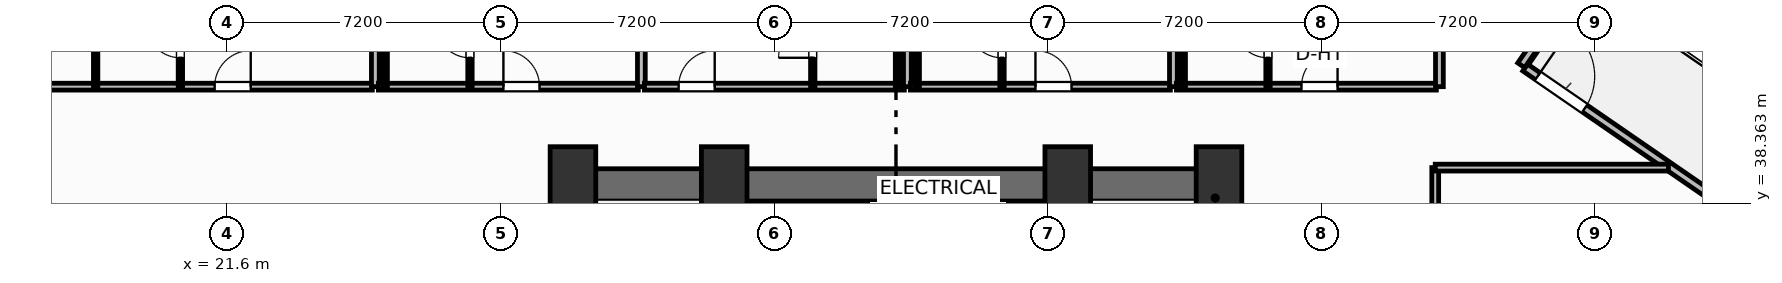
"""IFC4 building model, lengths in metres.
Left out: names, types, materials, properties, quantities, classifications, styles, units other than length and angle.
Written with IfcOpenShell. Run it as: python <this file> out.ifc"""

import sys

from ifc_helpers import new_model, si_unit, direction, frame, frame_2d, origin, origin_2d, place, context, subcontext, project, spatial, rectangle, extrude, element, fill, save


model = new_model("IFC4")
c1 = context("Model", 3, precision=1e-05, world=origin(), true_north=direction((0.0, 1.0)))
c2 = subcontext(c1, "Body", "Model", "MODEL_VIEW")
j1 = project(units=[si_unit("LENGTHUNIT", "METRE"), si_unit("PLANEANGLEUNIT", "RADIAN")], contexts=[c1])
p1 = place(None, origin())
s1 = spatial("IfcSite", under=j1, at=p1, CompositionType="ELEMENT")
p2 = place(p1, origin())
s2 = spatial("IfcBuilding", under=s1, at=p2, CompositionType="ELEMENT")
p3 = place(p2, frame((0.0, 0.0, 30.7)))
s3 = spatial("IfcBuildingStorey", under=s2, at=p3, CompositionType="ELEMENT", Elevation=30.7)
for number, where, z_axis, x_axis in (
    (1, (30.7, 39.05, 0.0), (0.0, 0.0, 1.0), (1.0, 0.0, 0.0)),
    (2, (34.68, 39.05, 0.0), (0.0, 0.0, 1.0), (1.0, 0.0, 0.0)),
    (3, (43.72, 39.05, 0.0), (0.0, 0.0, 1.0), (1.0, 0.0, 0.0)),
    (4, (47.7, 39.05, 0.0), (0.0, 0.0, 1.0), (1.0, 0.0, 0.0)),
):
    element("IfcColumn", number, at=place(p3, frame(where, z_axis=z_axis, x_axis=x_axis)), inside=s3, PredefinedType="COLUMN", context=c2, shape_type="SweptSolid", body=[
        extrude(rectangle(XDim=1.2, YDim=1.6, at=origin_2d()), origin(), (0.0, 0.0, 1.0), 3.7),
    ])
p4 = place(p3, frame((30.28, 38.845, 0.0), z_axis=(0.0, 0.0, 1.0), x_axis=(1.0, 0.0, 0.0)))
e5 = element("IfcWall", 5, at=p4, inside=s3, PredefinedType="SHEAR", context=c2, shape_type="SweptSolid", body=[
    extrude(rectangle(XDim=17.84, YDim=0.85, at=frame_2d((8.92, 0.0))), origin(), (0.0, 0.0, 1.0), 3.45),
])
for number, where, z_axis, x_axis in (
    (6, (30.705, 29.2, 0.0), (0.0, 0.0, 1.0), (0.0, 1.0, 0.0)),
    (7, (47.695, 29.2, 0.0), (0.0, 0.0, 1.0), (0.0, 1.0, 0.0)),
):
    element("IfcWall", number, at=place(p3, frame(where, z_axis=z_axis, x_axis=x_axis)), inside=s3, PredefinedType="SHEAR", context=c2, shape_type="SweptSolid", body=[
        extrude(rectangle(XDim=9.22, YDim=0.85, at=frame_2d((4.61, 0.0))), origin(), (0.0, 0.0, 1.0), 3.45),
    ])
p5 = place(p3, frame((34.64, 29.2, 0.0), z_axis=(0.0, 0.0, 1.0), x_axis=(0.0, 1.0, 0.0)))
e8 = element("IfcWall", 8, at=p5, inside=s3, PredefinedType="SHEAR", context=c2, shape_type="SweptSolid", body=[
    extrude(rectangle(XDim=9.22, YDim=0.25, at=frame_2d((4.61, 0.0))), origin(), (0.0, 0.0, 1.0), 3.45),
])
p6 = place(p5, frame((0.65, 0.0, 0.0)))
e9 = element("IfcOpeningElement", 9, at=p6, cuts=e8, PredefinedType="OPENING", context=c2, shape_type="SweptSolid", body=[
    extrude(rectangle(XDim=1.05, YDim=2.15, at=frame_2d((0.525, 1.075))), frame((0.0, 0.135, 0.0), z_axis=(0.0, -1.0, 0.0), x_axis=(1.0, 0.0, 0.0)), (0.0, 0.0, 1.0), 0.27),
])
p7 = place(p3, frame((43.76, 29.2, 0.0), z_axis=(0.0, 0.0, 1.0), x_axis=(0.0, 1.0, 0.0)))
e10 = element("IfcWall", 10, at=p7, inside=s3, PredefinedType="SHEAR", context=c2, shape_type="SweptSolid", body=[
    extrude(rectangle(XDim=9.22, YDim=0.25, at=frame_2d((4.61, 0.0))), origin(), (0.0, 0.0, 1.0), 3.45),
])
p8 = place(p7, frame((0.65, 0.0, 0.0)))
e11 = element("IfcOpeningElement", 11, at=p8, cuts=e10, PredefinedType="OPENING", context=c2, shape_type="SweptSolid", body=[
    extrude(rectangle(XDim=1.05, YDim=2.15, at=frame_2d((0.525, 1.075))), frame((0.0, 0.135, 0.0), z_axis=(0.0, -1.0, 0.0), x_axis=(1.0, 0.0, 0.0)), (0.0, 0.0, 1.0), 0.27),
])
p9 = place(p3, frame((55.757, 41.933, 0.0), z_axis=(0.0, 0.0, 1.0), x_axis=(0.823534636215, -0.567265989598, 0.0)))
e12 = element("IfcWall", 12, at=p9, inside=s3, PredefinedType="SOLIDWALL", context=c2, shape_type="SweptSolid", body=[
    extrude(rectangle(XDim=6.0, YDim=0.22, at=frame_2d((3.0, 0.0))), origin(), (0.0, 0.0, 1.0), 2.73),
])
p10 = place(p9, frame((0.4, 0.0, 0.0)))
e13 = element("IfcOpeningElement", 13, at=p10, cuts=e12, PredefinedType="OPENING", context=c2, shape_type="SweptSolid", body=[
    extrude(rectangle(XDim=1.5, YDim=2.25, at=frame_2d((0.75, 1.125))), frame((0.0, 0.12, 0.0), z_axis=(0.0, -1.0, 0.0), x_axis=(1.0, 0.0, 0.0)), (0.0, 0.0, 1.0), 0.24),
])
p11 = place(p3, frame((55.653, 41.993, 0.0), z_axis=(0.0, 0.0, 1.0), x_axis=(0.567273696173, 0.823529327729, 0.0)))
e14 = element("IfcWall", 14, at=p11, inside=s3, PredefinedType="SOLIDWALL", context=c2, shape_type="SweptSolid", body=[
    extrude(rectangle(XDim=2.1, YDim=0.22, at=frame_2d((1.05, 0.0))), origin(), (0.0, 0.0, 1.0), 2.73),
])
p12 = place(p3, frame((2.921, 41.43, 0.0), z_axis=(0.0, 0.0, 1.0), x_axis=(1.0, 0.0, 0.0)))
e15 = element("IfcWall", 15, at=p12, inside=s3, PredefinedType="PARTITIONING", context=c2, shape_type="SweptSolid", body=[
    extrude(rectangle(XDim=22.499, YDim=0.18, at=frame_2d((11.25, 0.0))), origin(), (0.0, 0.0, 1.0), 3.45),
])
p13 = place(p12, frame((18.35, 0.0, 0.0)))
e16 = element("IfcOpeningElement", 16, at=p13, cuts=e15, PredefinedType="OPENING", context=c2, shape_type="SweptSolid", body=[
    extrude(rectangle(XDim=0.95, YDim=2.15, at=frame_2d((0.475, 1.075))), frame((0.0, 0.1, 0.0), z_axis=(0.0, -1.0, 0.0), x_axis=(1.0, 0.0, 0.0)), (0.0, 0.0, 1.0), 0.2),
])
p14 = place(p3, frame((20.37, 41.43, 0.0), z_axis=(0.0, 0.0, 1.0), x_axis=(0.0, 1.0, 0.0)))
e17 = element("IfcWall", 17, at=p14, inside=s3, PredefinedType="PARTITIONING", context=c2, shape_type="SweptSolid", body=[
    extrude(rectangle(XDim=2.52, YDim=0.115, at=frame_2d((1.26, 0.0))), origin(), (0.0, 0.0, 1.0), 3.45),
])
p15 = place(p14, frame((0.76, 0.0, 0.0)))
e18 = element("IfcOpeningElement", 18, at=p15, cuts=e17, PredefinedType="OPENING", context=c2, shape_type="SweptSolid", body=[
    extrude(rectangle(XDim=0.9, YDim=2.05, at=frame_2d((0.45, 1.025))), frame((0.0, 0.067, 0.0), z_axis=(0.0, -1.0, 0.0), x_axis=(1.0, 0.0, 0.0)), (0.0, 0.0, 1.0), 0.135),
])
p16 = place(p3, frame((18.14, 41.43, 0.0), z_axis=(0.0, 0.0, 1.0), x_axis=(0.0, 1.0, 0.0)))
e19 = element("IfcWall", 19, at=p16, inside=s3, PredefinedType="PARTITIONING", context=c2, shape_type="SweptSolid", body=[
    extrude(rectangle(XDim=2.52, YDim=0.115, at=frame_2d((1.26, 0.0))), origin(), (0.0, 0.0, 1.0), 3.45),
])
p17 = place(p3, frame((25.5, 41.43, 0.0), z_axis=(0.0, 0.0, 1.0), x_axis=(0.0, 1.0, 0.0)))
e20 = element("IfcWall", 20, at=p17, inside=s3, PredefinedType="PARTITIONING", context=c2, shape_type="SweptSolid", body=[
    extrude(rectangle(XDim=14.57, YDim=0.205, at=frame_2d((7.285, 0.0))), origin(), (0.0, 0.0, 1.0), 3.45),
])
p18 = place(p3, frame((25.58, 41.43, 0.0), z_axis=(0.0, 0.0, 1.0), x_axis=(1.0, 0.0, 0.0)))
e21 = element("IfcWall", 21, at=p18, inside=s3, PredefinedType="PARTITIONING", context=c2, shape_type="SweptSolid", body=[
    extrude(rectangle(XDim=6.84, YDim=0.18, at=frame_2d((3.42, 0.0))), origin(), (0.0, 0.0, 1.0), 3.45),
])
p19 = place(p18, frame((3.29, 0.0, 0.0)))
e22 = element("IfcOpeningElement", 22, at=p19, cuts=e21, PredefinedType="OPENING", context=c2, shape_type="SweptSolid", body=[
    extrude(rectangle(XDim=0.95, YDim=2.15, at=frame_2d((0.475, 1.075))), frame((0.0, 0.1, 0.0), z_axis=(0.0, -1.0, 0.0), x_axis=(1.0, 0.0, 0.0)), (0.0, 0.0, 1.0), 0.2),
])
p20 = place(p3, frame((27.99, 41.43, 0.0), z_axis=(0.0, 0.0, 1.0), x_axis=(0.0, 1.0, 0.0)))
e23 = element("IfcWall", 23, at=p20, inside=s3, PredefinedType="PARTITIONING", context=c2, shape_type="SweptSolid", body=[
    extrude(rectangle(XDim=2.52, YDim=0.115, at=frame_2d((1.26, 0.0))), origin(), (0.0, 0.0, 1.0), 3.45),
])
p21 = place(p20, frame((0.76, 0.0, 0.0)))
e24 = element("IfcOpeningElement", 24, at=p21, cuts=e23, PredefinedType="OPENING", context=c2, shape_type="SweptSolid", body=[
    extrude(rectangle(XDim=0.9, YDim=2.05, at=frame_2d((0.45, 1.025))), frame((0.0, 0.067, 0.0), z_axis=(0.0, -1.0, 0.0), x_axis=(1.0, 0.0, 0.0)), (0.0, 0.0, 1.0), 0.135),
])
p22 = place(p3, frame((25.76, 41.43, 0.0), z_axis=(0.0, 0.0, 1.0), x_axis=(0.0, 1.0, 0.0)))
e25 = element("IfcWall", 25, at=p22, inside=s3, PredefinedType="PARTITIONING", context=c2, shape_type="SweptSolid", body=[
    extrude(rectangle(XDim=2.52, YDim=0.115, at=frame_2d((1.26, 0.0))), origin(), (0.0, 0.0, 1.0), 3.45),
])
p23 = place(p3, frame((32.5, 41.43, 0.0), z_axis=(0.0, 0.0, 1.0), x_axis=(0.0, 1.0, 0.0)))
e26 = element("IfcWall", 26, at=p23, inside=s3, PredefinedType="PARTITIONING", context=c2, shape_type="SweptSolid", body=[
    extrude(rectangle(XDim=14.57, YDim=0.205, at=frame_2d((7.285, 0.0))), origin(), (0.0, 0.0, 1.0), 3.45),
])
p24 = place(p3, frame((32.58, 41.43, 0.0), z_axis=(0.0, 0.0, 1.0), x_axis=(1.0, 0.0, 0.0)))
e27 = element("IfcWall", 27, at=p24, inside=s3, PredefinedType="PARTITIONING", context=c2, shape_type="SweptSolid", body=[
    extrude(rectangle(XDim=6.84, YDim=0.18, at=frame_2d((3.42, 0.0))), origin(), (0.0, 0.0, 1.0), 3.45),
])
p25 = place(p24, frame((0.9, 0.0, 0.0)))
e28 = element("IfcOpeningElement", 28, at=p25, cuts=e27, PredefinedType="OPENING", context=c2, shape_type="SweptSolid", body=[
    extrude(rectangle(XDim=0.95, YDim=2.15, at=frame_2d((0.475, 1.075))), frame((0.0, 0.1, 0.0), z_axis=(0.0, -1.0, 0.0), x_axis=(1.0, 0.0, 0.0)), (0.0, 0.0, 1.0), 0.2),
])
p26 = place(p3, frame((37.01, 41.43, 0.0), z_axis=(0.0, 0.0, 1.0), x_axis=(0.0, 1.0, 0.0)))
e29 = element("IfcWall", 29, at=p26, inside=s3, PredefinedType="PARTITIONING", context=c2, shape_type="SweptSolid", body=[
    extrude(rectangle(XDim=2.52, YDim=0.115, at=frame_2d((1.26, 0.0))), origin(), (0.0, 0.0, 1.0), 3.45),
])
p27 = place(p26, frame((0.76, 0.0, 0.0)))
e30 = element("IfcOpeningElement", 30, at=p27, cuts=e29, PredefinedType="OPENING", context=c2, shape_type="SweptSolid", body=[
    extrude(rectangle(XDim=0.9, YDim=2.05, at=frame_2d((0.45, 1.025))), frame((0.0, 0.067, 0.0), z_axis=(0.0, -1.0, 0.0), x_axis=(1.0, 0.0, 0.0)), (0.0, 0.0, 1.0), 0.135),
])
p28 = place(p3, frame((39.24, 41.43, 0.0), z_axis=(0.0, 0.0, 1.0), x_axis=(0.0, 1.0, 0.0)))
e31 = element("IfcWall", 31, at=p28, inside=s3, PredefinedType="PARTITIONING", context=c2, shape_type="SweptSolid", body=[
    extrude(rectangle(XDim=2.52, YDim=0.115, at=frame_2d((1.26, 0.0))), origin(), (0.0, 0.0, 1.0), 3.45),
])
p29 = place(p3, frame((39.5, 41.43, 0.0), z_axis=(0.0, 0.0, 1.0), x_axis=(0.0, 1.0, 0.0)))
e32 = element("IfcWall", 32, at=p29, inside=s3, PredefinedType="PARTITIONING", context=c2, shape_type="SweptSolid", body=[
    extrude(rectangle(XDim=14.215, YDim=0.205, at=frame_2d((7.107, 0.0))), origin(), (0.0, 0.0, 1.0), 3.45),
])
p30 = place(p3, frame((39.58, 41.43, 0.0), z_axis=(0.0, 0.0, 1.0), x_axis=(1.0, 0.0, 0.0)))
e33 = element("IfcWall", 33, at=p30, inside=s3, PredefinedType="PARTITIONING", context=c2, shape_type="SweptSolid", body=[
    extrude(rectangle(XDim=6.84, YDim=0.18, at=frame_2d((3.42, 0.0))), origin(), (0.0, 0.0, 1.0), 3.45),
])
p31 = place(p30, frame((3.29, 0.0, 0.0)))
e34 = element("IfcOpeningElement", 34, at=p31, cuts=e33, PredefinedType="OPENING", context=c2, shape_type="SweptSolid", body=[
    extrude(rectangle(XDim=0.95, YDim=2.15, at=frame_2d((0.475, 1.075))), frame((0.0, 0.1, 0.0), z_axis=(0.0, -1.0, 0.0), x_axis=(1.0, 0.0, 0.0)), (0.0, 0.0, 1.0), 0.2),
])
p32 = place(p3, frame((41.99, 41.43, 0.0), z_axis=(0.0, 0.0, 1.0), x_axis=(0.0, 1.0, 0.0)))
e35 = element("IfcWall", 35, at=p32, inside=s3, PredefinedType="PARTITIONING", context=c2, shape_type="SweptSolid", body=[
    extrude(rectangle(XDim=2.52, YDim=0.115, at=frame_2d((1.26, 0.0))), origin(), (0.0, 0.0, 1.0), 3.45),
])
p33 = place(p32, frame((0.76, 0.0, 0.0)))
e36 = element("IfcOpeningElement", 36, at=p33, cuts=e35, PredefinedType="OPENING", context=c2, shape_type="SweptSolid", body=[
    extrude(rectangle(XDim=0.9, YDim=2.05, at=frame_2d((0.45, 1.025))), frame((0.0, 0.067, 0.0), z_axis=(0.0, -1.0, 0.0), x_axis=(1.0, 0.0, 0.0)), (0.0, 0.0, 1.0), 0.135),
])
p34 = place(p3, frame((39.76, 41.43, 0.0), z_axis=(0.0, 0.0, 1.0), x_axis=(0.0, 1.0, 0.0)))
e37 = element("IfcWall", 37, at=p34, inside=s3, PredefinedType="PARTITIONING", context=c2, shape_type="SweptSolid", body=[
    extrude(rectangle(XDim=2.52, YDim=0.115, at=frame_2d((1.26, 0.0))), origin(), (0.0, 0.0, 1.0), 3.45),
])
p35 = place(p3, frame((46.5, 41.43, 0.0), z_axis=(0.0, 0.0, 1.0), x_axis=(0.0, 1.0, 0.0)))
e38 = element("IfcWall", 38, at=p35, inside=s3, PredefinedType="PARTITIONING", context=c2, shape_type="SweptSolid", body=[
    extrude(rectangle(XDim=6.843, YDim=0.205, at=frame_2d((3.421, 0.0))), origin(), (0.0, 0.0, 1.0), 2.58),
])
p36 = place(p3, frame((46.58, 41.43, 0.0), z_axis=(0.0, 0.0, 1.0), x_axis=(1.0, 0.0, 0.0)))
e39 = element("IfcWall", 39, at=p36, inside=s3, PredefinedType="PARTITIONING", context=c2, shape_type="SweptSolid", body=[
    extrude(rectangle(XDim=6.84, YDim=0.18, at=frame_2d((3.42, 0.0))), origin(), (0.0, 0.0, 1.0), 3.45),
])
p37 = place(p36, frame((3.29, 0.0, 0.0)))
e40 = element("IfcOpeningElement", 40, at=p37, cuts=e39, PredefinedType="OPENING", context=c2, shape_type="SweptSolid", body=[
    extrude(rectangle(XDim=0.95, YDim=2.15, at=frame_2d((0.475, 1.075))), frame((0.0, 0.1, 0.0), z_axis=(0.0, -1.0, 0.0), x_axis=(1.0, 0.0, 0.0)), (0.0, 0.0, 1.0), 0.2),
])
p38 = place(p3, frame((48.99, 41.43, 0.0), z_axis=(0.0, 0.0, 1.0), x_axis=(0.0, 1.0, 0.0)))
e41 = element("IfcWall", 41, at=p38, inside=s3, PredefinedType="PARTITIONING", context=c2, shape_type="SweptSolid", body=[
    extrude(rectangle(XDim=2.52, YDim=0.115, at=frame_2d((1.26, 0.0))), origin(), (0.0, 0.0, 1.0), 3.45),
])
p39 = place(p38, frame((0.76, 0.0, 0.0)))
e42 = element("IfcOpeningElement", 42, at=p39, cuts=e41, PredefinedType="OPENING", context=c2, shape_type="SweptSolid", body=[
    extrude(rectangle(XDim=0.9, YDim=2.05, at=frame_2d((0.45, 1.025))), frame((0.0, 0.067, 0.0), z_axis=(0.0, -1.0, 0.0), x_axis=(1.0, 0.0, 0.0)), (0.0, 0.0, 1.0), 0.135),
])
p40 = place(p3, frame((46.76, 41.43, 0.0), z_axis=(0.0, 0.0, 1.0), x_axis=(0.0, 1.0, 0.0)))
e43 = element("IfcWall", 43, at=p40, inside=s3, PredefinedType="PARTITIONING", context=c2, shape_type="SweptSolid", body=[
    extrude(rectangle(XDim=2.52, YDim=0.115, at=frame_2d((1.26, 0.0))), origin(), (0.0, 0.0, 1.0), 2.58),
])
p41 = place(p3, frame((53.5, 41.43, 0.0), z_axis=(0.0, 0.0, 1.0), x_axis=(0.0, 1.0, 0.0)))
e44 = element("IfcWall", 44, at=p41, inside=s3, PredefinedType="PARTITIONING", context=c2, shape_type="SweptSolid", body=[
    extrude(rectangle(XDim=4.571, YDim=0.205, at=frame_2d((2.286, 0.0))), origin(), (0.0, 0.0, 1.0), 3.45),
])
p42 = place(p3, frame((53.39, 19.24, 0.0), z_axis=(0.0, 0.0, 1.0), x_axis=(0.0, 1.0, 0.0)))
e45 = element("IfcWall", 45, at=p42, inside=s3, PredefinedType="PARTITIONING", context=c2, shape_type="SweptSolid", body=[
    extrude(rectangle(XDim=20.06, YDim=0.18, at=frame_2d((10.03, 0.0))), origin(), (0.0, 0.0, 1.0), 3.45),
])
p43 = place(p42, frame((7.7, 0.0, 0.0)))
e46 = element("IfcOpeningElement", 46, at=p43, cuts=e45, PredefinedType="OPENING", context=c2, shape_type="SweptSolid", body=[
    extrude(rectangle(XDim=0.95, YDim=2.05, at=frame_2d((0.475, 1.025))), frame((0.0, 0.1, 0.0), z_axis=(0.0, -1.0, 0.0), x_axis=(1.0, 0.0, 0.0)), (0.0, 0.0, 1.0), 0.2),
])
p44 = place(p3, frame((53.39, 39.3, 0.0), z_axis=(0.0, 0.0, 1.0), x_axis=(1.0, 0.0, 0.0)))
e47 = element("IfcWall", 47, at=p44, inside=s3, PredefinedType="PARTITIONING", context=c2, shape_type="SweptSolid", body=[
    extrude(rectangle(XDim=6.136, YDim=0.18, at=frame_2d((3.068, 0.0))), origin(), (0.0, 0.0, 1.0), 3.45),
])
p45 = place(p10, origin())
e48 = element("IfcDoor", 48, at=p45, inside=s3, OperationType="SINGLE_SWING_LEFT", PredefinedType="DOOR", context=c2, shape_type="SweptSolid", body=[
    extrude(rectangle(XDim=1.5, YDim=2.25, at=frame_2d((0.75, 1.125))), frame((0.0, 0.025, 0.0), z_axis=(0.0, -1.0, 0.0), x_axis=(1.0, 0.0, 0.0)), (0.0, 0.0, 1.0), 0.05),
])
fill(e13, e48)
p46 = place(p13, origin())
e49 = element("IfcDoor", 49, at=p46, inside=s3, OperationType="SINGLE_SWING_RIGHT", PredefinedType="DOOR", context=c2, shape_type="SweptSolid", body=[
    extrude(rectangle(XDim=0.95, YDim=2.15, at=frame_2d((0.475, 1.075))), frame((0.0, 0.025, 0.0), z_axis=(0.0, -1.0, 0.0), x_axis=(1.0, 0.0, 0.0)), (0.0, 0.0, 1.0), 0.05),
])
fill(e16, e49)
p47 = place(p15, origin())
e50 = element("IfcDoor", 50, at=p47, inside=s3, OperationType="SINGLE_SWING_RIGHT", PredefinedType="DOOR", context=c2, shape_type="SweptSolid", body=[
    extrude(rectangle(XDim=0.9, YDim=2.05, at=frame_2d((0.45, 1.025))), frame((0.0, 0.025, 0.0), z_axis=(0.0, -1.0, 0.0), x_axis=(1.0, 0.0, 0.0)), (0.0, 0.0, 1.0), 0.05),
])
fill(e18, e50)
p48 = place(p19, origin())
e51 = element("IfcDoor", 51, at=p48, inside=s3, OperationType="SINGLE_SWING_LEFT", PredefinedType="DOOR", context=c2, shape_type="SweptSolid", body=[
    extrude(rectangle(XDim=0.95, YDim=2.15, at=frame_2d((0.475, 1.075))), frame((0.0, 0.025, 0.0), z_axis=(0.0, -1.0, 0.0), x_axis=(1.0, 0.0, 0.0)), (0.0, 0.0, 1.0), 0.05),
])
fill(e22, e51)
p49 = place(p21, origin())
e52 = element("IfcDoor", 52, at=p49, inside=s3, OperationType="SINGLE_SWING_RIGHT", PredefinedType="DOOR", context=c2, shape_type="SweptSolid", body=[
    extrude(rectangle(XDim=0.9, YDim=2.05, at=frame_2d((0.45, 1.025))), frame((0.0, 0.025, 0.0), z_axis=(0.0, -1.0, 0.0), x_axis=(1.0, 0.0, 0.0)), (0.0, 0.0, 1.0), 0.05),
])
fill(e24, e52)
p50 = place(p25, origin())
e53 = element("IfcDoor", 53, at=p50, inside=s3, OperationType="SINGLE_SWING_RIGHT", PredefinedType="DOOR", context=c2, shape_type="SweptSolid", body=[
    extrude(rectangle(XDim=0.95, YDim=2.15, at=frame_2d((0.475, 1.075))), frame((0.0, 0.025, 0.0), z_axis=(0.0, -1.0, 0.0), x_axis=(1.0, 0.0, 0.0)), (0.0, 0.0, 1.0), 0.05),
])
fill(e28, e53)
p51 = place(p27, origin())
e54 = element("IfcDoor", 54, at=p51, inside=s3, OperationType="SINGLE_SWING_LEFT", PredefinedType="DOOR", context=c2, shape_type="SweptSolid", body=[
    extrude(rectangle(XDim=0.9, YDim=2.05, at=frame_2d((0.45, 1.025))), frame((0.0, 0.025, 0.0), z_axis=(0.0, -1.0, 0.0), x_axis=(1.0, 0.0, 0.0)), (0.0, 0.0, 1.0), 0.05),
])
fill(e30, e54)
p52 = place(p31, origin())
e55 = element("IfcDoor", 55, at=p52, inside=s3, OperationType="SINGLE_SWING_LEFT", PredefinedType="DOOR", context=c2, shape_type="SweptSolid", body=[
    extrude(rectangle(XDim=0.95, YDim=2.15, at=frame_2d((0.475, 1.075))), frame((0.0, 0.025, 0.0), z_axis=(0.0, -1.0, 0.0), x_axis=(1.0, 0.0, 0.0)), (0.0, 0.0, 1.0), 0.05),
])
fill(e34, e55)
p53 = place(p33, origin())
e56 = element("IfcDoor", 56, at=p53, inside=s3, OperationType="SINGLE_SWING_RIGHT", PredefinedType="DOOR", context=c2, shape_type="SweptSolid", body=[
    extrude(rectangle(XDim=0.9, YDim=2.05, at=frame_2d((0.45, 1.025))), frame((0.0, 0.025, 0.0), z_axis=(0.0, -1.0, 0.0), x_axis=(1.0, 0.0, 0.0)), (0.0, 0.0, 1.0), 0.05),
])
fill(e36, e56)
p54 = place(p37, origin())
e57 = element("IfcDoor", 57, at=p54, inside=s3, OperationType="SINGLE_SWING_RIGHT", PredefinedType="DOOR", context=c2, shape_type="SweptSolid", body=[
    extrude(rectangle(XDim=0.95, YDim=2.15, at=frame_2d((0.475, 1.075))), frame((0.0, 0.025, 0.0), z_axis=(0.0, -1.0, 0.0), x_axis=(1.0, 0.0, 0.0)), (0.0, 0.0, 1.0), 0.05),
])
fill(e40, e57)
p55 = place(p39, origin())
e58 = element("IfcDoor", 58, at=p55, inside=s3, OperationType="SINGLE_SWING_RIGHT", PredefinedType="DOOR", context=c2, shape_type="SweptSolid", body=[
    extrude(rectangle(XDim=0.9, YDim=2.05, at=frame_2d((0.45, 1.025))), frame((0.0, 0.025, 0.0), z_axis=(0.0, -1.0, 0.0), x_axis=(1.0, 0.0, 0.0)), (0.0, 0.0, 1.0), 0.05),
])
fill(e42, e58)
save(model, sys.argv[1])
